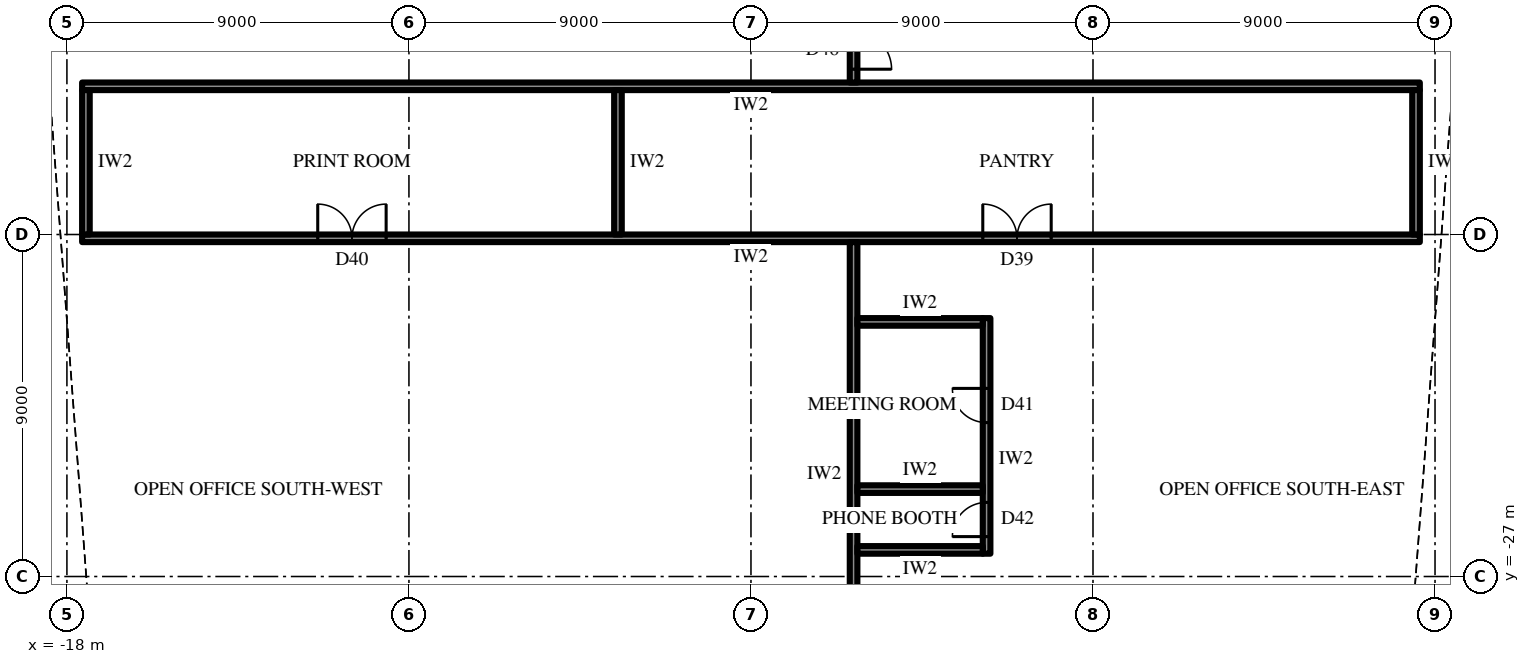
"""IFC4 building model, lengths in metres.
Left out: names, types, materials, properties, quantities, classifications, styles, units other than length and angle.
Written with IfcOpenShell. Run it as: python <this file> out.ifc"""

import sys

from ifc_helpers import new_model, si_unit, direction, frame, frame_2d, origin, place, context, subcontext, project, spatial, rectangle, extrude, element, fill, save


model = new_model("IFC4")
c1 = context("Model", 3, precision=1e-05, world=origin(), true_north=direction((0.0, 1.0)))
c2 = subcontext(c1, "Body", "Model", "MODEL_VIEW")
j1 = project(units=[si_unit("LENGTHUNIT", "METRE"), si_unit("PLANEANGLEUNIT", "RADIAN")], contexts=[c1])
p1 = place(None, origin())
s1 = spatial("IfcSite", under=j1, at=p1, CompositionType="ELEMENT")
p2 = place(p1, origin())
s2 = spatial("IfcBuilding", under=s1, at=p2, CompositionType="ELEMENT")
p3 = place(p2, frame((0.0, 0.0, 148.9)))
s3 = spatial("IfcBuildingStorey", under=s2, at=p3, CompositionType="ELEMENT", Elevation=148.9)
p4 = place(p3, frame((17.6, -14.1, 0.0), z_axis=(0.0, 0.0, 1.0), x_axis=(-1.0, 0.0, 0.0)))
e1 = element("IfcWall", 1, at=p4, inside=s3, PredefinedType="PARTITIONING", context=c2, shape_type="SweptSolid", body=[
    extrude(rectangle(XDim=35.2, YDim=0.2, at=frame_2d((17.6, 0.0))), origin(), (0.0, 0.0, 1.0), 4.0),
])
p5 = place(p3, frame((17.6, -18.1, 0.0), z_axis=(0.0, 0.0, 1.0), x_axis=(-1.0, 0.0, 0.0)))
e2 = element("IfcWall", 2, at=p5, inside=s3, PredefinedType="PARTITIONING", context=c2, shape_type="SweptSolid", body=[
    extrude(rectangle(XDim=35.2, YDim=0.2, at=frame_2d((17.6, 0.0))), origin(), (0.0, 0.0, 1.0), 4.0),
])
p6 = place(p5, frame((9.7, 0.0, 0.0)))
e3 = element("IfcOpeningElement", 3, at=p6, cuts=e2, PredefinedType="OPENING", context=c2, shape_type="SweptSolid", body=[
    extrude(rectangle(XDim=1.8, YDim=2.4, at=frame_2d((0.9, 1.2))), frame((0.0, 0.11, 0.0), z_axis=(0.0, -1.0, 0.0), x_axis=(1.0, 0.0, 0.0)), (0.0, 0.0, 1.0), 0.22),
])
p7 = place(p5, frame((27.2, 0.0, 0.0)))
e4 = element("IfcOpeningElement", 4, at=p7, cuts=e2, PredefinedType="OPENING", context=c2, shape_type="SweptSolid", body=[
    extrude(rectangle(XDim=1.8, YDim=2.4, at=frame_2d((0.9, 1.2))), frame((0.0, 0.11, 0.0), z_axis=(0.0, -1.0, 0.0), x_axis=(1.0, 0.0, 0.0)), (0.0, 0.0, 1.0), 0.22),
])
for number, where, z_axis, x_axis in (
    (5, (17.5, -14.2, 0.0), (0.0, 0.0, 1.0), (0.0, -1.0, 0.0)),
    (6, (-3.5, -14.2, 0.0), (0.0, 0.0, 1.0), (0.0, -1.0, 0.0)),
    (7, (-17.5, -14.2, 0.0), (0.0, 0.0, 1.0), (0.0, -1.0, 0.0)),
):
    element("IfcWall", number, at=place(p3, frame(where, z_axis=z_axis, x_axis=x_axis)), inside=s3, PredefinedType="PARTITIONING", context=c2, shape_type="SweptSolid", body=[
        extrude(rectangle(XDim=3.8, YDim=0.2, at=frame_2d((1.9, 0.0))), origin(), (0.0, 0.0, 1.0), 4.0),
    ])
p8 = place(p3, frame((2.7, -12.3, 0.0), z_axis=(0.0, 0.0, 1.0), x_axis=(0.0, -1.0, 0.0)))
e8 = element("IfcWall", 8, at=p8, inside=s3, PredefinedType="PARTITIONING", context=c2, shape_type="SweptSolid", body=[
    extrude(rectangle(XDim=1.7, YDim=0.2, at=frame_2d((0.85, 0.0))), origin(), (0.0, 0.0, 1.0), 4.0),
])
p9 = place(p8, frame((0.35, 0.0, 0.0)))
e9 = element("IfcOpeningElement", 9, at=p9, cuts=e8, PredefinedType="OPENING", context=c2, shape_type="SweptSolid", body=[
    extrude(rectangle(XDim=1.0, YDim=2.2, at=frame_2d((0.5, 1.1))), frame((0.0, 0.11, 0.0), z_axis=(0.0, -1.0, 0.0), x_axis=(1.0, 0.0, 0.0)), (0.0, 0.0, 1.0), 0.22),
])
p10 = place(p3, frame((2.7, -18.2, 0.0), z_axis=(0.0, 0.0, 1.0), x_axis=(0.0, -1.0, 0.0)))
e10 = element("IfcWall", 10, at=p10, inside=s3, PredefinedType="PARTITIONING", context=c2, shape_type="SweptSolid", body=[
    extrude(rectangle(XDim=10.2, YDim=0.2, at=frame_2d((5.1, 0.0))), origin(), (0.0, 0.0, 1.0), 4.0),
])
p11 = place(p3, frame((6.2, -20.2, 0.0), z_axis=(0.0, 0.0, 1.0), x_axis=(0.0, -1.0, 0.0)))
e11 = element("IfcWall", 11, at=p11, inside=s3, PredefinedType="PARTITIONING", context=c2, shape_type="SweptSolid", body=[
    extrude(rectangle(XDim=6.2, YDim=0.2, at=frame_2d((3.1, 0.0))), origin(), (0.0, 0.0, 1.0), 4.0),
])
p12 = place(p11, frame((1.85, 0.0, 0.0)))
e12 = element("IfcOpeningElement", 12, at=p12, cuts=e11, PredefinedType="OPENING", context=c2, shape_type="SweptSolid", body=[
    extrude(rectangle(XDim=0.9, YDim=2.2, at=frame_2d((0.45, 1.1))), frame((0.0, 0.11, 0.0), z_axis=(0.0, -1.0, 0.0), x_axis=(1.0, 0.0, 0.0)), (0.0, 0.0, 1.0), 0.22),
])
p13 = place(p11, frame((4.85, 0.0, 0.0)))
e13 = element("IfcOpeningElement", 13, at=p13, cuts=e11, PredefinedType="OPENING", context=c2, shape_type="SweptSolid", body=[
    extrude(rectangle(XDim=0.9, YDim=2.2, at=frame_2d((0.45, 1.1))), frame((0.0, 0.11, 0.0), z_axis=(0.0, -1.0, 0.0), x_axis=(1.0, 0.0, 0.0)), (0.0, 0.0, 1.0), 0.22),
])
for number, where, z_axis, x_axis in (
    (14, (2.8, -20.3, 0.0), (0.0, 0.0, 1.0), (1.0, 0.0, 0.0)),
    (15, (2.8, -24.7, 0.0), (0.0, 0.0, 1.0), (1.0, 0.0, 0.0)),
    (16, (2.8, -26.3, 0.0), (0.0, 0.0, 1.0), (1.0, 0.0, 0.0)),
):
    element("IfcWall", number, at=place(p3, frame(where, z_axis=z_axis, x_axis=x_axis)), inside=s3, PredefinedType="PARTITIONING", context=c2, shape_type="SweptSolid", body=[
        extrude(rectangle(XDim=3.3, YDim=0.2, at=frame_2d((1.65, 0.0))), origin(), (0.0, 0.0, 1.0), 4.0),
    ])
p14 = place(p6, frame((1.8, 0.0, 0.0), z_axis=(0.0, 0.0, 1.0), x_axis=(-1.0, 0.0, 0.0)))
e17 = element("IfcDoor", 17, at=p14, inside=s3, OperationType="DOUBLE_DOOR_SINGLE_SWING", PredefinedType="DOOR", context=c2, shape_type="SweptSolid", body=[
    extrude(rectangle(XDim=1.8, YDim=2.4, at=frame_2d((0.9, 1.2))), frame((0.0, 0.025, 0.0), z_axis=(0.0, -1.0, 0.0), x_axis=(1.0, 0.0, 0.0)), (0.0, 0.0, 1.0), 0.05),
])
fill(e3, e17)
p15 = place(p7, frame((1.8, 0.0, 0.0), z_axis=(0.0, 0.0, 1.0), x_axis=(-1.0, 0.0, 0.0)))
e18 = element("IfcDoor", 18, at=p15, inside=s3, OperationType="DOUBLE_DOOR_SINGLE_SWING", PredefinedType="DOOR", context=c2, shape_type="SweptSolid", body=[
    extrude(rectangle(XDim=1.8, YDim=2.4, at=frame_2d((0.9, 1.2))), frame((0.0, 0.025, 0.0), z_axis=(0.0, -1.0, 0.0), x_axis=(1.0, 0.0, 0.0)), (0.0, 0.0, 1.0), 0.05),
])
fill(e4, e18)
p16 = place(p9, origin())
e19 = element("IfcDoor", 19, at=p16, inside=s3, OperationType="SINGLE_SWING_LEFT", PredefinedType="DOOR", context=c2, shape_type="SweptSolid", body=[
    extrude(rectangle(XDim=1.0, YDim=2.2, at=frame_2d((0.5, 1.1))), frame((0.0, 0.025, 0.0), z_axis=(0.0, -1.0, 0.0), x_axis=(1.0, 0.0, 0.0)), (0.0, 0.0, 1.0), 0.05),
])
fill(e9, e19)
p17 = place(p12, frame((0.9, 0.0, 0.0), z_axis=(0.0, 0.0, 1.0), x_axis=(-1.0, 0.0, 0.0)))
e20 = element("IfcDoor", 20, at=p17, inside=s3, OperationType="SINGLE_SWING_LEFT", PredefinedType="DOOR", context=c2, shape_type="SweptSolid", body=[
    extrude(rectangle(XDim=0.9, YDim=2.2, at=frame_2d((0.45, 1.1))), frame((0.0, 0.025, 0.0), z_axis=(0.0, -1.0, 0.0), x_axis=(1.0, 0.0, 0.0)), (0.0, 0.0, 1.0), 0.05),
])
fill(e12, e20)
p18 = place(p13, frame((0.9, 0.0, 0.0), z_axis=(0.0, 0.0, 1.0), x_axis=(-1.0, 0.0, 0.0)))
e21 = element("IfcDoor", 21, at=p18, inside=s3, OperationType="SINGLE_SWING_RIGHT", PredefinedType="DOOR", context=c2, shape_type="SweptSolid", body=[
    extrude(rectangle(XDim=0.9, YDim=2.2, at=frame_2d((0.45, 1.1))), frame((0.0, 0.025, 0.0), z_axis=(0.0, -1.0, 0.0), x_axis=(1.0, 0.0, 0.0)), (0.0, 0.0, 1.0), 0.05),
])
fill(e13, e21)
save(model, sys.argv[1])
